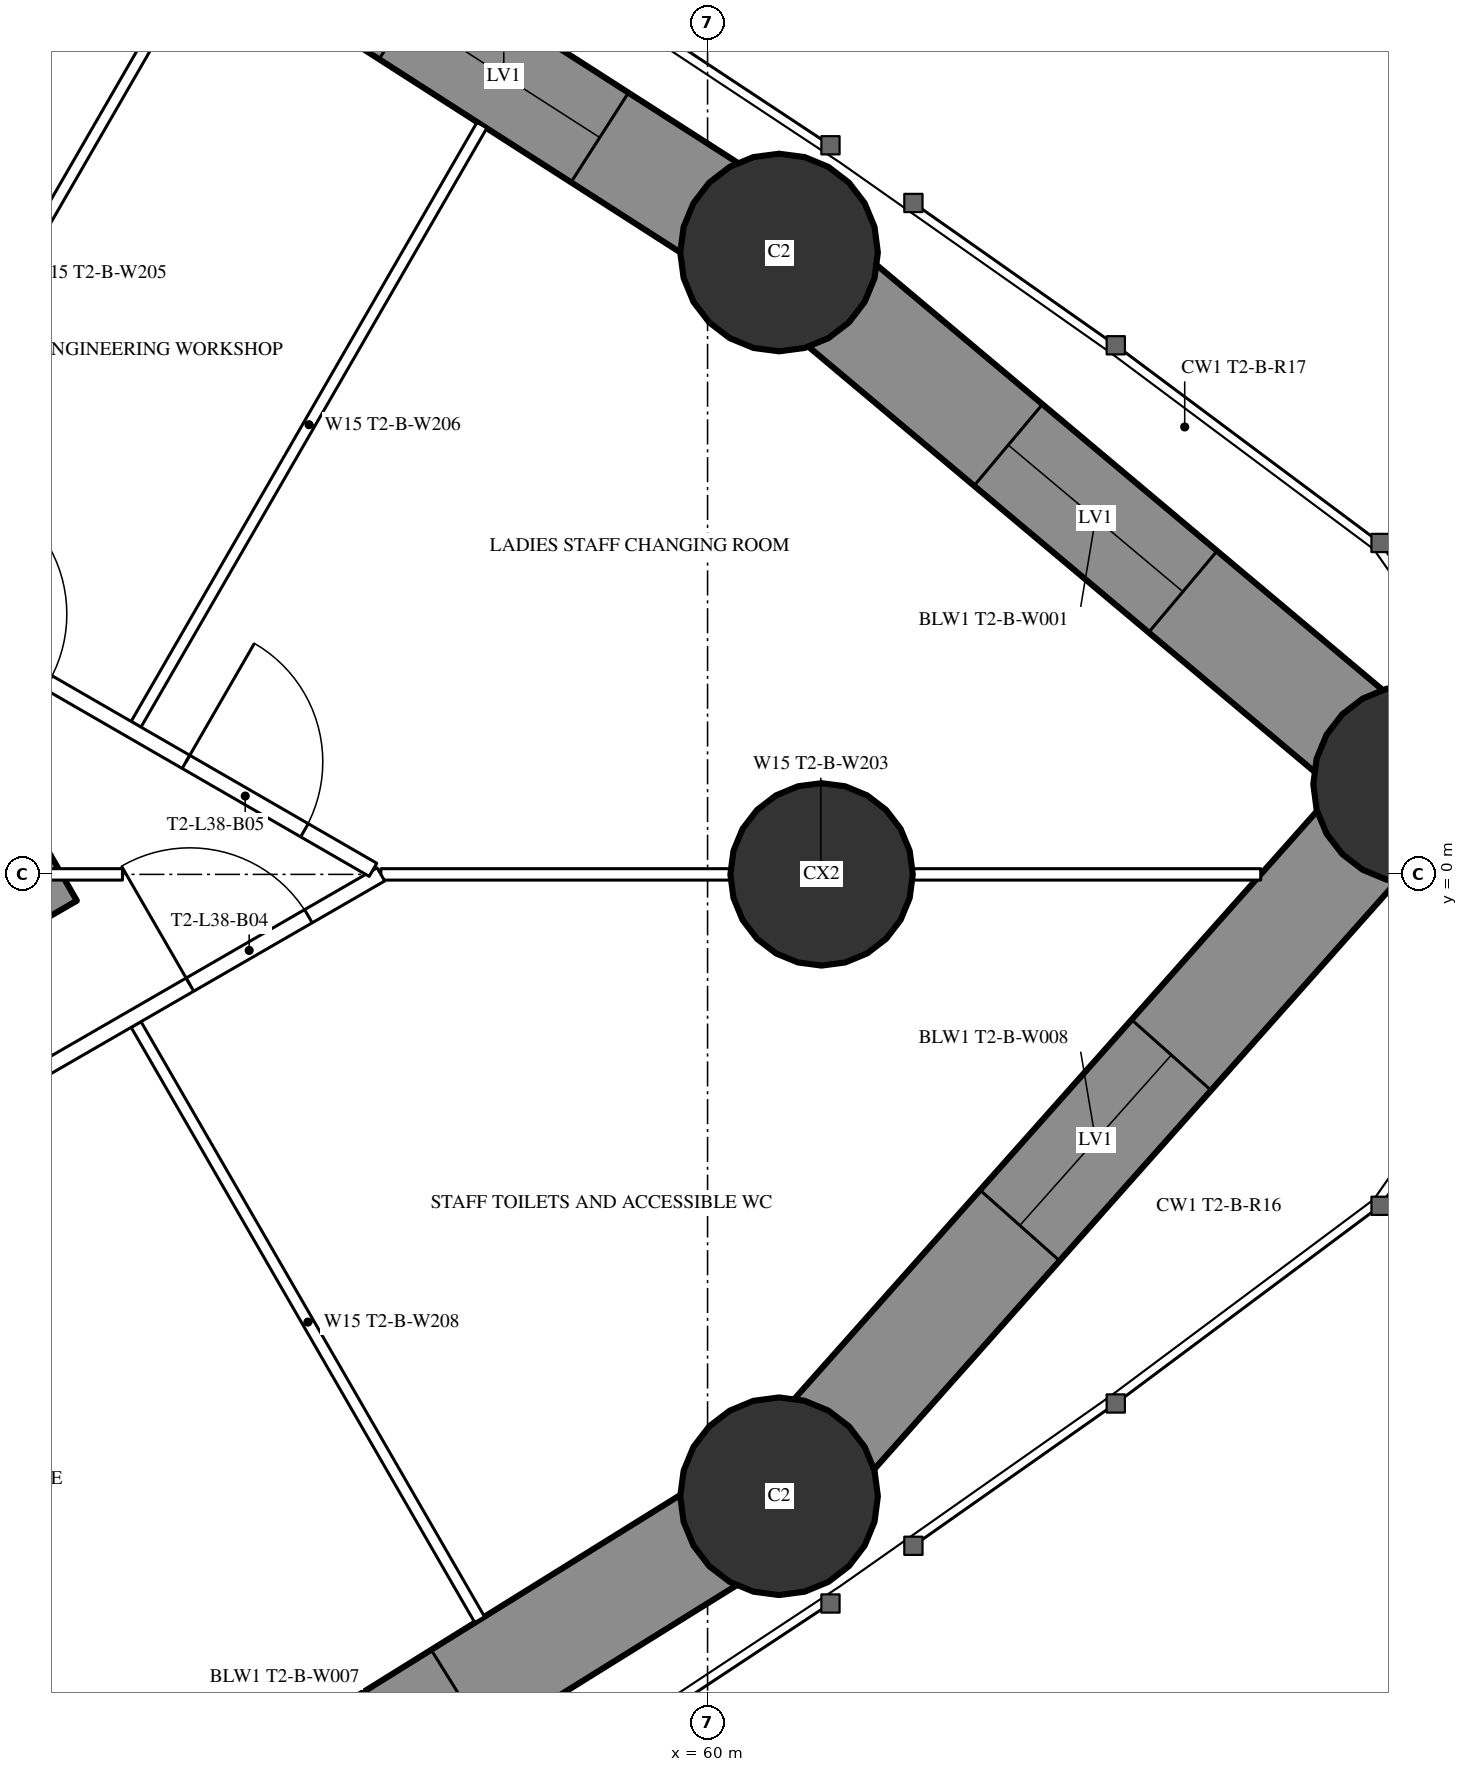
"""IFC4 building model, lengths in metres.
Left out: names, types, materials, properties, quantities, classifications, styles, units other than length and angle.
Written with IfcOpenShell. Run it as: python <this file> out.ifc"""

import sys

from ifc_helpers import new_model, si_unit, direction, frame, frame_2d, origin, origin_2d, place, context, subcontext, project, spatial, rectangle, circle, hollow_circle, extrude, element, fill, save


model = new_model("IFC4")
c1 = context("Model", 3, precision=1e-05, world=origin(), true_north=direction((0.0, 1.0)))
c2 = subcontext(c1, "Body", "Model", "MODEL_VIEW")
j1 = project(units=[si_unit("LENGTHUNIT", "METRE"), si_unit("PLANEANGLEUNIT", "RADIAN")], contexts=[c1])
p1 = place(None, origin())
s1 = spatial("IfcSite", under=j1, at=p1, CompositionType="ELEMENT")
p2 = place(p1, origin())
s2 = spatial("IfcBuilding", under=s1, at=p2, CompositionType="ELEMENT")
p3 = place(p2, frame((0.0, 0.0, 143.1)))
s3 = spatial("IfcBuildingStorey", under=s2, at=p3, CompositionType="ELEMENT", Elevation=143.1)
for number, where, z_axis, x_axis in (
    (1, (69.269, 1.187, 0.0), (0.0, 0.0, 1.0), (1.0, 0.0, 0.0)),
    (2, (60.941, 8.181, 0.0), (0.0, 0.0, 1.0), (1.0, 0.0, 0.0)),
    (3, (60.941, -8.181, 0.0), (0.0, 0.0, 1.0), (1.0, 0.0, 0.0)),
):
    element("IfcColumn", number, at=place(p3, frame(where, z_axis=z_axis, x_axis=x_axis)), inside=s3, PredefinedType="COLUMN", context=c2, shape_type="SweptSolid", body=[
        extrude(hollow_circle(Radius=1.3, WallThickness=0.1, at=origin_2d()), origin(), (0.0, 0.0, 1.0), 3.6),
    ])
p4 = place(p3, frame((61.5, 0.0, 0.0), z_axis=(0.0, 0.0, 1.0), x_axis=(1.0, 0.0, 0.0)))
e4 = element("IfcColumn", 4, at=p4, inside=s3, PredefinedType="COLUMN", context=c2, shape_type="SweptSolid", body=[
    extrude(circle(Radius=1.2, at=origin_2d()), origin(), (0.0, 0.0, 1.0), 3.6),
])
p5 = place(p3, frame((27.2, -13.8, 0.0), z_axis=(0.0, 0.0, 1.0), x_axis=(0.866027159892, 0.499996958321, 0.0)))
e5 = element("IfcWall", 5, at=p5, inside=s3, PredefinedType="SHEAR", context=c2, shape_type="SweptSolid", body=[
    extrude(rectangle(XDim=27.947, YDim=1.2, at=frame_2d((13.973, 0.0))), origin(), (0.0, 0.0, 1.0), 3.6),
])
p6 = place(p5, frame((4.6, 0.0, 0.0)))
e6 = element("IfcOpeningElement", 6, at=p6, cuts=e5, PredefinedType="OPENING", context=c2, shape_type="SweptSolid", body=[
    extrude(rectangle(XDim=1.0, YDim=2.2, at=frame_2d((0.5, 1.1))), frame((0.0, 0.61, 0.0), z_axis=(0.0, -1.0, 0.0), x_axis=(1.0, 0.0, 0.0)), (0.0, 0.0, 1.0), 1.22),
])
p7 = place(p5, frame((14.045, 0.0, 0.0)))
e7 = element("IfcOpeningElement", 7, at=p7, cuts=e5, PredefinedType="OPENING", context=c2, shape_type="SweptSolid", body=[
    extrude(rectangle(XDim=1.8, YDim=2.2, at=frame_2d((0.9, 1.1))), frame((0.0, 0.61, 0.0), z_axis=(0.0, -1.0, 0.0), x_axis=(1.0, 0.0, 0.0)), (0.0, 0.0, 1.0), 1.22),
])
p8 = place(p3, frame((49.979, -14.994, 0.0), z_axis=(0.0, 0.0, 1.0), x_axis=(0.849312372751, 0.527890607505, 0.0)))
e8 = element("IfcWall", 8, at=p8, inside=s3, PredefinedType="SHEAR", context=c2, shape_type="SweptSolid", body=[
    extrude(rectangle(XDim=12.906, YDim=1.4, at=frame_2d((6.453, 0.0))), origin(), (0.0, 0.0, 1.0), 3.6),
])
p9 = place(p8, frame((4.953, 0.0, 0.6)))
e9 = element("IfcOpeningElement", 9, at=p9, cuts=e8, PredefinedType="OPENING", context=c2, shape_type="SweptSolid", body=[
    extrude(rectangle(XDim=3.0, YDim=1.2, at=frame_2d((1.5, 0.6))), frame((0.0, 0.71, 0.0), z_axis=(0.0, -1.0, 0.0), x_axis=(1.0, 0.0, 0.0)), (0.0, 0.0, 1.0), 1.42),
])
p10 = place(p3, frame((60.941, -8.181, 0.0), z_axis=(0.0, 0.0, 1.0), x_axis=(0.664421866815, 0.74735773422, 0.0)))
e10 = element("IfcWall", 10, at=p10, inside=s3, PredefinedType="SHEAR", context=c2, shape_type="SweptSolid", body=[
    extrude(rectangle(XDim=12.534, YDim=1.4, at=frame_2d((6.267, 0.0))), origin(), (0.0, 0.0, 1.0), 3.6),
])
p11 = place(p10, frame((4.767, 0.0, 0.6)))
e11 = element("IfcOpeningElement", 11, at=p11, cuts=e10, PredefinedType="OPENING", context=c2, shape_type="SweptSolid", body=[
    extrude(rectangle(XDim=3.0, YDim=1.2, at=frame_2d((1.5, 0.6))), frame((0.0, 0.71, 0.0), z_axis=(0.0, -1.0, 0.0), x_axis=(1.0, 0.0, 0.0)), (0.0, 0.0, 1.0), 1.42),
])
p12 = place(p3, frame((69.269, 1.187, 0.0), z_axis=(0.0, 0.0, 1.0), x_axis=(-0.765749969712, 0.643138386264, 0.0)))
e12 = element("IfcWall", 12, at=p12, inside=s3, PredefinedType="SHEAR", context=c2, shape_type="SweptSolid", body=[
    extrude(rectangle(XDim=10.876, YDim=1.4, at=frame_2d((5.438, 0.0))), origin(), (0.0, 0.0, 1.0), 3.6),
])
p13 = place(p12, frame((3.938, 0.0, 0.6)))
e13 = element("IfcOpeningElement", 13, at=p13, cuts=e12, PredefinedType="OPENING", context=c2, shape_type="SweptSolid", body=[
    extrude(rectangle(XDim=3.0, YDim=1.2, at=frame_2d((1.5, 0.6))), frame((0.0, 0.71, 0.0), z_axis=(0.0, -1.0, 0.0), x_axis=(1.0, 0.0, 0.0)), (0.0, 0.0, 1.0), 1.42),
])
p14 = place(p3, frame((60.941, 8.181, 0.0), z_axis=(0.0, 0.0, 1.0), x_axis=(-0.841727408736, 0.539902740669, 0.0)))
e14 = element("IfcWall", 14, at=p14, inside=s3, PredefinedType="SHEAR", context=c2, shape_type="SweptSolid", body=[
    extrude(rectangle(XDim=8.606, YDim=1.4, at=frame_2d((4.303, 0.0))), origin(), (0.0, 0.0, 1.0), 3.6),
])
p15 = place(p14, frame((2.803, 0.0, 0.6)))
e15 = element("IfcOpeningElement", 15, at=p15, cuts=e14, PredefinedType="OPENING", context=c2, shape_type="SweptSolid", body=[
    extrude(rectangle(XDim=3.0, YDim=1.2, at=frame_2d((1.5, 0.6))), frame((0.0, 0.71, 0.0), z_axis=(0.0, -1.0, 0.0), x_axis=(1.0, 0.0, 0.0)), (0.0, 0.0, 1.0), 1.42),
])
p16 = place(p3, frame((52.481, -1.975, 0.0), z_axis=(0.0, 0.0, 1.0), x_axis=(0.499984247144, -0.866034498509, 0.0)))
e16 = element("IfcWall", 16, at=p16, inside=s3, PredefinedType="PARTITIONING", context=c2, shape_type="SweptSolid", body=[
    extrude(rectangle(XDim=9.041, YDim=0.15, at=frame_2d((4.521, 0.0))), origin(), (0.0, 0.0, 1.0), 3.35),
])
p17 = place(p3, frame((48.719, 4.147, 0.0), z_axis=(0.0, 0.0, 1.0), x_axis=(0.499993328235, 0.866029255696, 0.0)))
e17 = element("IfcWall", 17, at=p17, inside=s3, PredefinedType="PARTITIONING", context=c2, shape_type="SweptSolid", body=[
    extrude(rectangle(XDim=8.686, YDim=0.15, at=frame_2d((4.343, 0.0))), origin(), (0.0, 0.0, 1.0), 2.15),
])
p18 = place(p3, frame((52.481, 1.975, 0.0), z_axis=(0.0, 0.0, 1.0), x_axis=(0.500008073096, 0.86602074273, 0.0)))
e18 = element("IfcWall", 18, at=p18, inside=s3, PredefinedType="PARTITIONING", context=c2, shape_type="SweptSolid", body=[
    extrude(rectangle(XDim=9.101, YDim=0.15, at=frame_2d((4.55, 0.0))), origin(), (0.0, 0.0, 1.0), 3.35),
])
p19 = place(p3, frame((55.702, 0.0, 0.0), z_axis=(0.0, 0.0, 1.0), x_axis=(1.0, 0.0, 0.0)))
e19 = element("IfcWall", 19, at=p19, inside=s3, PredefinedType="PARTITIONING", context=c2, shape_type="SweptSolid", body=[
    extrude(rectangle(XDim=11.575, YDim=0.15, at=frame_2d((5.788, 0.0))), origin(), (0.0, 0.0, 1.0), 2.15),
])
p20 = place(p3, frame((37.96, -10.243, 0.0), z_axis=(0.0, 0.0, 1.0), x_axis=(0.866026429433, 0.499998223521, 0.0)))
e20 = element("IfcWall", 20, at=p20, inside=s3, PredefinedType="PARTITIONING", context=c2, shape_type="SweptSolid", body=[
    extrude(rectangle(XDim=20.487, YDim=0.2, at=frame_2d((10.243, 0.0))), origin(), (0.0, 0.0, 1.0), 3.35),
])
p21 = place(p20, frame((11.464, 0.0, 0.0)))
e21 = element("IfcOpeningElement", 21, at=p21, cuts=e20, PredefinedType="OPENING", context=c2, shape_type="SweptSolid", body=[
    extrude(rectangle(XDim=1.8, YDim=2.2, at=frame_2d((0.9, 1.1))), frame((0.0, 0.11, 0.0), z_axis=(0.0, -1.0, 0.0), x_axis=(1.0, 0.0, 0.0)), (0.0, 0.0, 1.0), 0.22),
])
p22 = place(p20, frame((17.586, 0.0, 0.0)))
e22 = element("IfcOpeningElement", 22, at=p22, cuts=e20, PredefinedType="OPENING", context=c2, shape_type="SweptSolid", body=[
    extrude(rectangle(XDim=1.8, YDim=2.14, at=frame_2d((0.9, 1.07))), frame((0.0, 0.11, 0.0), z_axis=(0.0, -1.0, 0.0), x_axis=(1.0, 0.0, 0.0)), (0.0, 0.0, 1.0), 0.22),
])
p23 = place(p20, frame((3.221, 0.0, 0.0)))
e23 = element("IfcOpeningElement", 23, at=p23, cuts=e20, PredefinedType="OPENING", context=c2, shape_type="SweptSolid", body=[
    extrude(rectangle(XDim=1.8, YDim=2.2, at=frame_2d((0.9, 1.1))), frame((0.0, 0.11, 0.0), z_axis=(0.0, -1.0, 0.0), x_axis=(1.0, 0.0, 0.0)), (0.0, 0.0, 1.0), 0.22),
])
p24 = place(p3, frame((36.834, 10.894, 0.0), z_axis=(0.0, 0.0, 1.0), x_axis=(0.866028157229, -0.499995230863, 0.0)))
e24 = element("IfcWall", 24, at=p24, inside=s3, PredefinedType="PARTITIONING", context=c2, shape_type="SweptSolid", body=[
    extrude(rectangle(XDim=21.667, YDim=0.2, at=frame_2d((10.833, 0.0))), origin(), (0.0, 0.0, 1.0), 3.35),
])
p25 = place(p24, frame((18.826, 0.0, 0.0)))
e25 = element("IfcOpeningElement", 25, at=p25, cuts=e24, PredefinedType="OPENING", context=c2, shape_type="SweptSolid", body=[
    extrude(rectangle(XDim=1.8, YDim=2.2, at=frame_2d((0.9, 1.1))), frame((0.0, 0.11, 0.0), z_axis=(0.0, -1.0, 0.0), x_axis=(1.0, 0.0, 0.0)), (0.0, 0.0, 1.0), 0.22),
])
p26 = place(p24, frame((14.938, 0.0, 0.0)))
e26 = element("IfcOpeningElement", 26, at=p26, cuts=e24, PredefinedType="OPENING", context=c2, shape_type="SweptSolid", body=[
    extrude(rectangle(XDim=1.8, YDim=2.2, at=frame_2d((0.9, 1.1))), frame((0.0, 0.11, 0.0), z_axis=(0.0, -1.0, 0.0), x_axis=(1.0, 0.0, 0.0)), (0.0, 0.0, 1.0), 0.22),
])
p27 = place(p24, frame((6.248, 0.0, 0.0)))
e27 = element("IfcOpeningElement", 27, at=p27, cuts=e24, PredefinedType="OPENING", context=c2, shape_type="SweptSolid", body=[
    extrude(rectangle(XDim=1.8, YDim=2.2, at=frame_2d((0.9, 1.1))), frame((0.0, 0.11, 0.0), z_axis=(0.0, -1.0, 0.0), x_axis=(1.0, 0.0, 0.0)), (0.0, 0.0, 1.0), 0.22),
])
p28 = place(p3, frame((44.575, 0.0, 0.0), z_axis=(0.0, 0.0, 1.0), x_axis=(1.0, 0.0, 0.0)))
e28 = element("IfcWall", 28, at=p28, inside=s3, PredefinedType="PARTITIONING", context=c2, shape_type="SweptSolid", body=[
    extrude(rectangle(XDim=7.727, YDim=0.15, at=frame_2d((3.864, 0.0))), origin(), (0.0, 0.0, 1.0), 2.15),
])
p29 = place(p11, origin())
e29 = element("IfcWindow", 29, at=p29, inside=s3, PartitioningType="SINGLE_PANEL", PredefinedType="WINDOW", context=c2, shape_type="SweptSolid", body=[
    extrude(rectangle(XDim=3.0, YDim=1.2, at=frame_2d((1.5, 0.6))), frame((0.0, 0.03, 0.0), z_axis=(0.0, -1.0, 0.0), x_axis=(1.0, 0.0, 0.0)), (0.0, 0.0, 1.0), 0.06),
])
fill(e11, e29)
p30 = place(p13, origin())
e30 = element("IfcWindow", 30, at=p30, inside=s3, PartitioningType="SINGLE_PANEL", PredefinedType="WINDOW", context=c2, shape_type="SweptSolid", body=[
    extrude(rectangle(XDim=3.0, YDim=1.2, at=frame_2d((1.5, 0.6))), frame((0.0, 0.03, 0.0), z_axis=(0.0, -1.0, 0.0), x_axis=(1.0, 0.0, 0.0)), (0.0, 0.0, 1.0), 0.06),
])
fill(e13, e30)
p31 = place(p15, origin())
e31 = element("IfcWindow", 31, at=p31, inside=s3, PartitioningType="SINGLE_PANEL", PredefinedType="WINDOW", context=c2, shape_type="SweptSolid", body=[
    extrude(rectangle(XDim=3.0, YDim=1.2, at=frame_2d((1.5, 0.6))), frame((0.0, 0.03, 0.0), z_axis=(0.0, -1.0, 0.0), x_axis=(1.0, 0.0, 0.0)), (0.0, 0.0, 1.0), 0.06),
])
fill(e15, e31)
p32 = place(p22, origin())
e32 = element("IfcDoor", 32, at=p32, inside=s3, OperationType="DOUBLE_DOOR_SINGLE_SWING", PredefinedType="DOOR", context=c2, shape_type="SweptSolid", body=[
    extrude(rectangle(XDim=1.8, YDim=2.14, at=frame_2d((0.9, 1.07))), frame((0.0, 0.025, 0.0), z_axis=(0.0, -1.0, 0.0), x_axis=(1.0, 0.0, 0.0)), (0.0, 0.0, 1.0), 0.05),
])
fill(e22, e32)
p33 = place(p25, origin())
e33 = element("IfcDoor", 33, at=p33, inside=s3, OperationType="DOUBLE_DOOR_SINGLE_SWING", PredefinedType="DOOR", context=c2, shape_type="SweptSolid", body=[
    extrude(rectangle(XDim=1.8, YDim=2.2, at=frame_2d((0.9, 1.1))), frame((0.0, 0.025, 0.0), z_axis=(0.0, -1.0, 0.0), x_axis=(1.0, 0.0, 0.0)), (0.0, 0.0, 1.0), 0.05),
])
fill(e25, e33)
save(model, sys.argv[1])
